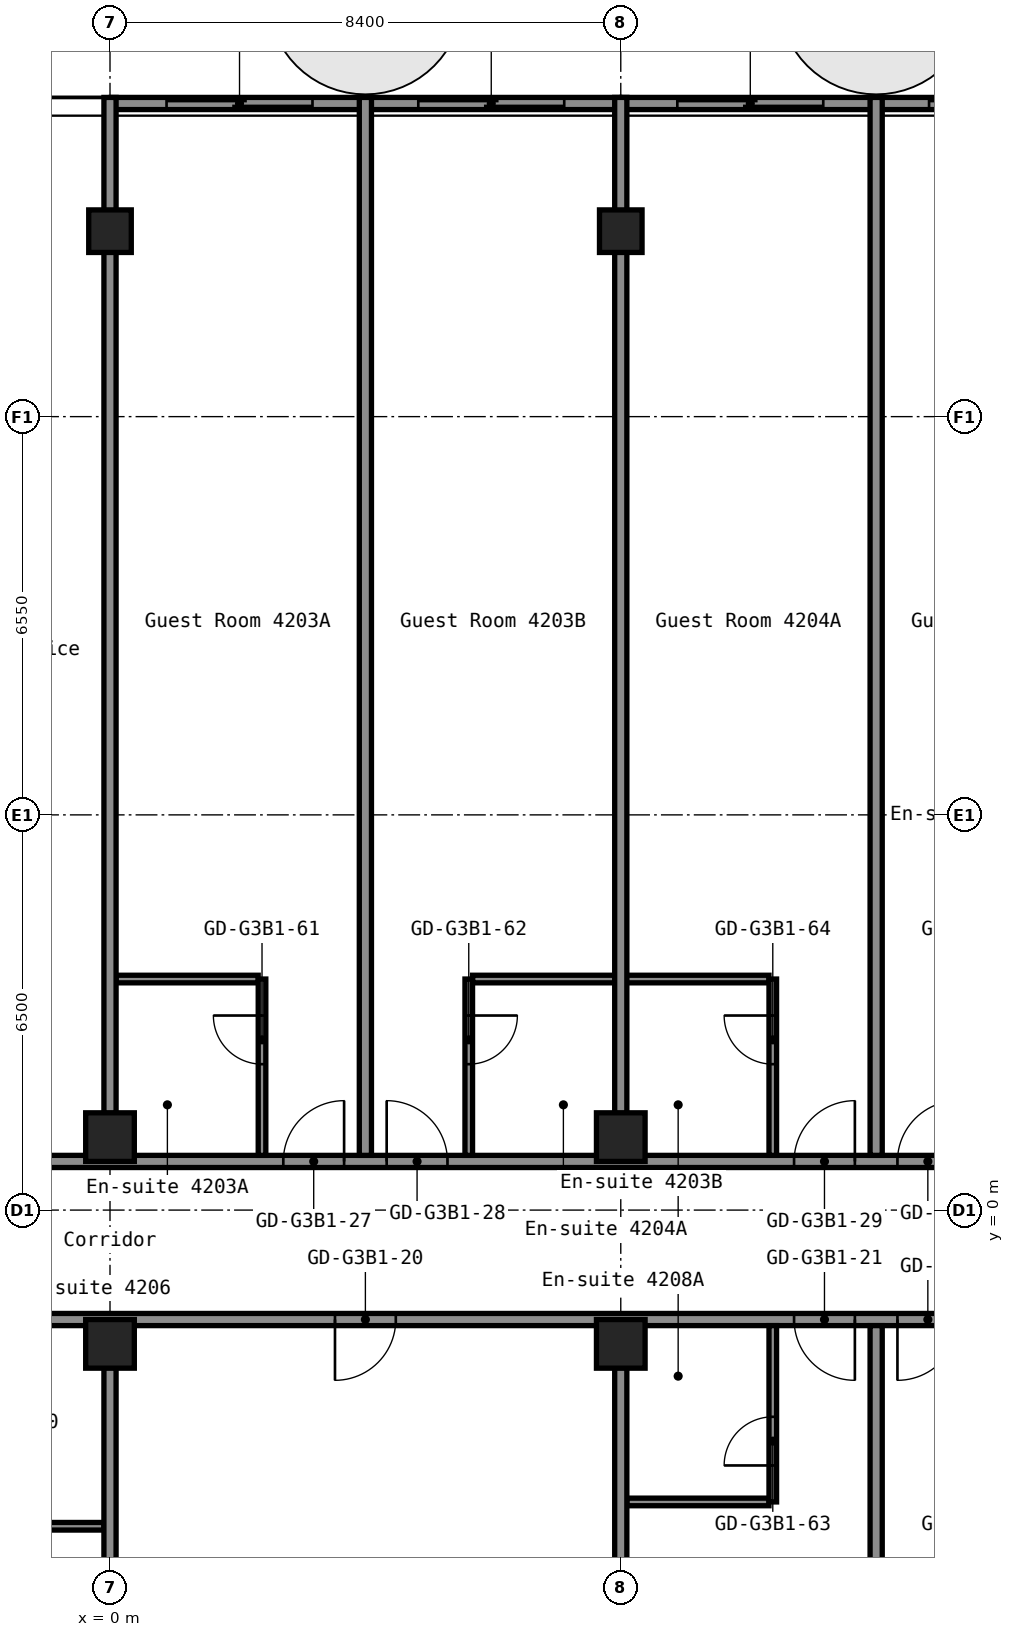
"""IFC4 building model, lengths in metres.
Left out: names, types, materials, properties, quantities, classifications, styles, units other than length and angle.
Written with IfcOpenShell. Run it as: python <this file> out.ifc"""

import sys

from ifc_helpers import new_model, si_unit, direction, frame, frame_2d, origin, origin_2d, place, context, subcontext, project, spatial, rectangle, hollow_rectangle, extrude, element, fill, save


model = new_model("IFC4")
c1 = context("Model", 3, precision=1e-05, world=origin(), true_north=direction((0.0, 1.0)))
c2 = subcontext(c1, "Body", "Model", "MODEL_VIEW")
j1 = project(units=[si_unit("LENGTHUNIT", "METRE"), si_unit("PLANEANGLEUNIT", "RADIAN")], contexts=[c1])
p1 = place(None, origin())
s1 = spatial("IfcSite", under=j1, at=p1, CompositionType="ELEMENT")
p2 = place(p1, origin())
s2 = spatial("IfcBuilding", under=s1, at=p2, CompositionType="ELEMENT")
p3 = place(p2, frame((0.0, 0.0, 150.2)))
s3 = spatial("IfcBuildingStorey", under=s2, at=p3, CompositionType="ELEMENT", Elevation=150.2)
for number, where, z_axis, x_axis in (
    (1, (0.0, -2.2, 0.0), (0.0, 0.0, 1.0), (1.0, 0.0, 0.0)),
    (2, (0.0, 1.2, 0.0), (0.0, 0.0, 1.0), (1.0, 0.0, 0.0)),
):
    element("IfcColumn", number, at=place(p3, frame(where, z_axis=z_axis, x_axis=x_axis)), inside=s3, PredefinedType="COLUMN", context=c2, shape_type="SweptSolid", body=[
        extrude(hollow_rectangle(XDim=0.8, YDim=0.8, WallThickness=0.032, at=origin_2d()), origin(), (0.0, 0.0, 1.0), 2.75),
    ])
p4 = place(p3, frame((0.0, 16.1, 0.0), z_axis=(0.0, 0.0, 1.0), x_axis=(1.0, 0.0, 0.0)))
e3 = element("IfcColumn", 3, at=p4, inside=s3, PredefinedType="COLUMN", context=c2, shape_type="SweptSolid", body=[
    extrude(hollow_rectangle(XDim=0.7, YDim=0.7, WallThickness=0.028, at=origin_2d()), origin(), (0.0, 0.0, 1.0), 2.75),
])
for number, where, z_axis, x_axis in (
    (4, (8.4, -2.2, 0.0), (0.0, 0.0, 1.0), (1.0, 0.0, 0.0)),
    (5, (8.4, 1.2, 0.0), (0.0, 0.0, 1.0), (1.0, 0.0, 0.0)),
):
    element("IfcColumn", number, at=place(p3, frame(where, z_axis=z_axis, x_axis=x_axis)), inside=s3, PredefinedType="COLUMN", context=c2, shape_type="SweptSolid", body=[
        extrude(hollow_rectangle(XDim=0.8, YDim=0.8, WallThickness=0.032, at=origin_2d()), origin(), (0.0, 0.0, 1.0), 2.75),
    ])
p5 = place(p3, frame((8.4, 16.1, 0.0), z_axis=(0.0, 0.0, 1.0), x_axis=(1.0, 0.0, 0.0)))
e6 = element("IfcColumn", 6, at=p5, inside=s3, PredefinedType="COLUMN", context=c2, shape_type="SweptSolid", body=[
    extrude(hollow_rectangle(XDim=0.7, YDim=0.7, WallThickness=0.028, at=origin_2d()), origin(), (0.0, 0.0, 1.0), 2.75),
])
p6 = place(p3, frame((-3.538, -5.2, 0.0), z_axis=(0.0, 0.0, 1.0), x_axis=(1.0, 0.0, 0.0)))
e7 = element("IfcWall", 7, at=p6, inside=s3, PredefinedType="PARTITIONING", context=c2, shape_type="SweptSolid", body=[
    extrude(rectangle(XDim=3.438, YDim=0.125, at=frame_2d((1.719, 0.0))), origin(), (0.0, 0.0, 1.0), 2.75),
])
p7 = place(p3, frame((8.5, -4.8, 0.0), z_axis=(0.0, 0.0, 1.0), x_axis=(1.0, 0.0, 0.0)))
e8 = element("IfcWall", 8, at=p7, inside=s3, PredefinedType="PARTITIONING", context=c2, shape_type="SweptSolid", body=[
    extrude(rectangle(XDim=2.337, YDim=0.125, at=frame_2d((1.169, 0.0))), origin(), (0.0, 0.0, 1.0), 2.75),
])
p8 = place(p3, frame((-16.8, -1.8, 0.0), z_axis=(0.0, 0.0, 1.0), x_axis=(1.0, 0.0, 0.0)))
e9 = element("IfcWall", 9, at=p8, inside=s3, PredefinedType="PARTITIONING", context=c2, shape_type="SweptSolid", body=[
    extrude(rectangle(XDim=33.6, YDim=0.2, at=frame_2d((16.8, 0.0))), origin(), (0.0, 0.0, 1.0), 2.75),
])
p9 = place(p8, frame((2.85, 0.0, 0.0)))
e10 = element("IfcOpeningElement", 10, at=p9, cuts=e9, PredefinedType="OPENING", context=c2, shape_type="SweptSolid", body=[
    extrude(rectangle(XDim=1.0, YDim=2.1, at=frame_2d((0.5, 1.05))), frame((0.0, 0.11, 0.0), z_axis=(0.0, -1.0, 0.0), x_axis=(1.0, 0.0, 0.0)), (0.0, 0.0, 1.0), 0.22),
])
p10 = place(p8, frame((4.55, 0.0, 0.0)))
e11 = element("IfcOpeningElement", 11, at=p10, cuts=e9, PredefinedType="OPENING", context=c2, shape_type="SweptSolid", body=[
    extrude(rectangle(XDim=1.0, YDim=2.1, at=frame_2d((0.5, 1.05))), frame((0.0, 0.11, 0.0), z_axis=(0.0, -1.0, 0.0), x_axis=(1.0, 0.0, 0.0)), (0.0, 0.0, 1.0), 0.22),
])
p11 = place(p8, frame((10.3, 0.0, 0.0)))
e12 = element("IfcOpeningElement", 12, at=p11, cuts=e9, PredefinedType="OPENING", context=c2, shape_type="SweptSolid", body=[
    extrude(rectangle(XDim=1.0, YDim=2.1, at=frame_2d((0.5, 1.05))), frame((0.0, 0.11, 0.0), z_axis=(0.0, -1.0, 0.0), x_axis=(1.0, 0.0, 0.0)), (0.0, 0.0, 1.0), 0.22),
])
p12 = place(p8, frame((20.5, 0.0, 0.0)))
e13 = element("IfcOpeningElement", 13, at=p12, cuts=e9, PredefinedType="OPENING", context=c2, shape_type="SweptSolid", body=[
    extrude(rectangle(XDim=1.0, YDim=2.1, at=frame_2d((0.5, 1.05))), frame((0.0, 0.11, 0.0), z_axis=(0.0, -1.0, 0.0), x_axis=(1.0, 0.0, 0.0)), (0.0, 0.0, 1.0), 0.22),
])
p13 = place(p8, frame((28.05, 0.0, 0.0)))
e14 = element("IfcOpeningElement", 14, at=p13, cuts=e9, PredefinedType="OPENING", context=c2, shape_type="SweptSolid", body=[
    extrude(rectangle(XDim=1.0, YDim=2.1, at=frame_2d((0.5, 1.05))), frame((0.0, 0.11, 0.0), z_axis=(0.0, -1.0, 0.0), x_axis=(1.0, 0.0, 0.0)), (0.0, 0.0, 1.0), 0.22),
])
p14 = place(p8, frame((29.75, 0.0, 0.0)))
e15 = element("IfcOpeningElement", 15, at=p14, cuts=e9, PredefinedType="OPENING", context=c2, shape_type="SweptSolid", body=[
    extrude(rectangle(XDim=1.0, YDim=2.1, at=frame_2d((0.5, 1.05))), frame((0.0, 0.11, 0.0), z_axis=(0.0, -1.0, 0.0), x_axis=(1.0, 0.0, 0.0)), (0.0, 0.0, 1.0), 0.22),
])
p15 = place(p3, frame((-16.8, 0.8, 0.0), z_axis=(0.0, 0.0, 1.0), x_axis=(1.0, 0.0, 0.0)))
e16 = element("IfcWall", 16, at=p15, inside=s3, PredefinedType="PARTITIONING", context=c2, shape_type="SweptSolid", body=[
    extrude(rectangle(XDim=33.6, YDim=0.2, at=frame_2d((16.8, 0.0))), origin(), (0.0, 0.0, 1.0), 2.75),
])
p16 = place(p15, frame((2.85, 0.0, 0.0)))
e17 = element("IfcOpeningElement", 17, at=p16, cuts=e16, PredefinedType="OPENING", context=c2, shape_type="SweptSolid", body=[
    extrude(rectangle(XDim=1.0, YDim=2.1, at=frame_2d((0.5, 1.05))), frame((0.0, 0.11, 0.0), z_axis=(0.0, -1.0, 0.0), x_axis=(1.0, 0.0, 0.0)), (0.0, 0.0, 1.0), 0.22),
])
p17 = place(p15, frame((4.55, 0.0, 0.0)))
e18 = element("IfcOpeningElement", 18, at=p17, cuts=e16, PredefinedType="OPENING", context=c2, shape_type="SweptSolid", body=[
    extrude(rectangle(XDim=1.0, YDim=2.1, at=frame_2d((0.5, 1.05))), frame((0.0, 0.11, 0.0), z_axis=(0.0, -1.0, 0.0), x_axis=(1.0, 0.0, 0.0)), (0.0, 0.0, 1.0), 0.22),
])
p18 = place(p15, frame((10.22, 0.0, 0.0)))
e19 = element("IfcOpeningElement", 19, at=p18, cuts=e16, PredefinedType="OPENING", context=c2, shape_type="SweptSolid", body=[
    extrude(rectangle(XDim=0.9, YDim=2.1, at=frame_2d((0.45, 1.05))), frame((0.0, 0.11, 0.0), z_axis=(0.0, -1.0, 0.0), x_axis=(1.0, 0.0, 0.0)), (0.0, 0.0, 1.0), 0.22),
])
p19 = place(p15, frame((14.42, 0.0, 0.0)))
e20 = element("IfcOpeningElement", 20, at=p19, cuts=e16, PredefinedType="OPENING", context=c2, shape_type="SweptSolid", body=[
    extrude(rectangle(XDim=0.9, YDim=2.1, at=frame_2d((0.45, 1.05))), frame((0.0, 0.11, 0.0), z_axis=(0.0, -1.0, 0.0), x_axis=(1.0, 0.0, 0.0)), (0.0, 0.0, 1.0), 0.22),
])
p20 = place(p15, frame((19.65, 0.0, 0.0)))
e21 = element("IfcOpeningElement", 21, at=p20, cuts=e16, PredefinedType="OPENING", context=c2, shape_type="SweptSolid", body=[
    extrude(rectangle(XDim=1.0, YDim=2.1, at=frame_2d((0.5, 1.05))), frame((0.0, 0.11, 0.0), z_axis=(0.0, -1.0, 0.0), x_axis=(1.0, 0.0, 0.0)), (0.0, 0.0, 1.0), 0.22),
])
p21 = place(p15, frame((21.35, 0.0, 0.0)))
e22 = element("IfcOpeningElement", 22, at=p21, cuts=e16, PredefinedType="OPENING", context=c2, shape_type="SweptSolid", body=[
    extrude(rectangle(XDim=1.0, YDim=2.1, at=frame_2d((0.5, 1.05))), frame((0.0, 0.11, 0.0), z_axis=(0.0, -1.0, 0.0), x_axis=(1.0, 0.0, 0.0)), (0.0, 0.0, 1.0), 0.22),
])
p22 = place(p15, frame((28.05, 0.0, 0.0)))
e23 = element("IfcOpeningElement", 23, at=p22, cuts=e16, PredefinedType="OPENING", context=c2, shape_type="SweptSolid", body=[
    extrude(rectangle(XDim=1.0, YDim=2.1, at=frame_2d((0.5, 1.05))), frame((0.0, 0.11, 0.0), z_axis=(0.0, -1.0, 0.0), x_axis=(1.0, 0.0, 0.0)), (0.0, 0.0, 1.0), 0.22),
])
p23 = place(p15, frame((29.75, 0.0, 0.0)))
e24 = element("IfcOpeningElement", 24, at=p23, cuts=e16, PredefinedType="OPENING", context=c2, shape_type="SweptSolid", body=[
    extrude(rectangle(XDim=1.0, YDim=2.1, at=frame_2d((0.5, 1.05))), frame((0.0, 0.11, 0.0), z_axis=(0.0, -1.0, 0.0), x_axis=(1.0, 0.0, 0.0)), (0.0, 0.0, 1.0), 0.22),
])
p24 = place(p3, frame((0.1, 3.8, 0.0), z_axis=(0.0, 0.0, 1.0), x_axis=(1.0, 0.0, 0.0)))
e25 = element("IfcWall", 25, at=p24, inside=s3, PredefinedType="PARTITIONING", context=c2, shape_type="SweptSolid", body=[
    extrude(rectangle(XDim=2.337, YDim=0.125, at=frame_2d((1.169, 0.0))), origin(), (0.0, 0.0, 1.0), 2.75),
])
p25 = place(p3, frame((5.962, 3.8, 0.0), z_axis=(0.0, 0.0, 1.0), x_axis=(1.0, 0.0, 0.0)))
e26 = element("IfcWall", 26, at=p25, inside=s3, PredefinedType="PARTITIONING", context=c2, shape_type="SweptSolid", body=[
    extrude(rectangle(XDim=4.875, YDim=0.125, at=frame_2d((2.438, 0.0))), origin(), (0.0, 0.0, 1.0), 2.75),
])
for number, where, z_axis, x_axis in (
    (27, (0.0, -19.3, 0.0), (0.0, 0.0, 1.0), (0.0, 1.0, 0.0)),
    (28, (0.0, 1.59, 0.0), (0.0, 0.0, 1.0), (0.0, 1.0, 0.0)),
):
    element("IfcWall", number, at=place(p3, frame(where, z_axis=z_axis, x_axis=x_axis)), inside=s3, PredefinedType="PARTITIONING", context=c2, shape_type="SweptSolid", body=[
        extrude(rectangle(XDim=16.71, YDim=0.2, at=frame_2d((8.355, 0.0))), origin(), (0.0, 0.0, 1.0), 2.75),
    ])
p26 = place(p3, frame((2.5, 0.9, 0.0), z_axis=(0.0, 0.0, 1.0), x_axis=(0.0, 1.0, 0.0)))
e29 = element("IfcWall", 29, at=p26, inside=s3, PredefinedType="PARTITIONING", context=c2, shape_type="SweptSolid", body=[
    extrude(rectangle(XDim=2.9, YDim=0.125, at=frame_2d((1.45, 0.0))), origin(), (0.0, 0.0, 1.0), 2.75),
])
p27 = place(p26, frame((1.5, 0.0, 0.0)))
e30 = element("IfcOpeningElement", 30, at=p27, cuts=e29, PredefinedType="OPENING", context=c2, shape_type="SweptSolid", body=[
    extrude(rectangle(XDim=0.8, YDim=2.1, at=frame_2d((0.4, 1.05))), frame((0.0, 0.073, 0.0), z_axis=(0.0, -1.0, 0.0), x_axis=(1.0, 0.0, 0.0)), (0.0, 0.0, 1.0), 0.145),
])
p28 = place(p3, frame((4.2, 0.9, 0.0), z_axis=(0.0, 0.0, 1.0), x_axis=(0.0, 1.0, 0.0)))
e31 = element("IfcWall", 31, at=p28, inside=s3, PredefinedType="PARTITIONING", context=c2, shape_type="SweptSolid", body=[
    extrude(rectangle(XDim=17.4, YDim=0.2, at=frame_2d((8.7, 0.0))), origin(), (0.0, 0.0, 1.0), 2.75),
])
p29 = place(p3, frame((5.9, 0.9, 0.0), z_axis=(0.0, 0.0, 1.0), x_axis=(0.0, 1.0, 0.0)))
e32 = element("IfcWall", 32, at=p29, inside=s3, PredefinedType="PARTITIONING", context=c2, shape_type="SweptSolid", body=[
    extrude(rectangle(XDim=2.9, YDim=0.125, at=frame_2d((1.45, 0.0))), origin(), (0.0, 0.0, 1.0), 2.75),
])
p30 = place(p29, frame((1.5, 0.0, 0.0)))
e33 = element("IfcOpeningElement", 33, at=p30, cuts=e32, PredefinedType="OPENING", context=c2, shape_type="SweptSolid", body=[
    extrude(rectangle(XDim=0.8, YDim=2.1, at=frame_2d((0.4, 1.05))), frame((0.0, 0.073, 0.0), z_axis=(0.0, -1.0, 0.0), x_axis=(1.0, 0.0, 0.0)), (0.0, 0.0, 1.0), 0.145),
])
for number, where, z_axis, x_axis in (
    (34, (8.4, -19.3, 0.0), (0.0, 0.0, 1.0), (0.0, 1.0, 0.0)),
    (35, (8.4, 1.59, 0.0), (0.0, 0.0, 1.0), (0.0, 1.0, 0.0)),
):
    element("IfcWall", number, at=place(p3, frame(where, z_axis=z_axis, x_axis=x_axis)), inside=s3, PredefinedType="PARTITIONING", context=c2, shape_type="SweptSolid", body=[
        extrude(rectangle(XDim=16.71, YDim=0.2, at=frame_2d((8.355, 0.0))), origin(), (0.0, 0.0, 1.0), 2.75),
    ])
p31 = place(p3, frame((10.9, -4.8, 0.0), z_axis=(0.0, 0.0, 1.0), x_axis=(0.0, 1.0, 0.0)))
e36 = element("IfcWall", 36, at=p31, inside=s3, PredefinedType="PARTITIONING", context=c2, shape_type="SweptSolid", body=[
    extrude(rectangle(XDim=2.9, YDim=0.125, at=frame_2d((1.45, 0.0))), origin(), (0.0, 0.0, 1.0), 2.75),
])
p32 = place(p31, frame((0.6, 0.0, 0.0)))
e37 = element("IfcOpeningElement", 37, at=p32, cuts=e36, PredefinedType="OPENING", context=c2, shape_type="SweptSolid", body=[
    extrude(rectangle(XDim=0.8, YDim=2.1, at=frame_2d((0.4, 1.05))), frame((0.0, 0.073, 0.0), z_axis=(0.0, -1.0, 0.0), x_axis=(1.0, 0.0, 0.0)), (0.0, 0.0, 1.0), 0.145),
])
p33 = place(p3, frame((10.9, 0.9, 0.0), z_axis=(0.0, 0.0, 1.0), x_axis=(0.0, 1.0, 0.0)))
e38 = element("IfcWall", 38, at=p33, inside=s3, PredefinedType="PARTITIONING", context=c2, shape_type="SweptSolid", body=[
    extrude(rectangle(XDim=2.9, YDim=0.125, at=frame_2d((1.45, 0.0))), origin(), (0.0, 0.0, 1.0), 2.75),
])
p34 = place(p33, frame((1.5, 0.0, 0.0)))
e39 = element("IfcOpeningElement", 39, at=p34, cuts=e38, PredefinedType="OPENING", context=c2, shape_type="SweptSolid", body=[
    extrude(rectangle(XDim=0.8, YDim=2.1, at=frame_2d((0.4, 1.05))), frame((0.0, 0.073, 0.0), z_axis=(0.0, -1.0, 0.0), x_axis=(1.0, 0.0, 0.0)), (0.0, 0.0, 1.0), 0.145),
])
for number, where, z_axis, x_axis in (
    (40, (12.6, -19.3, 0.0), (0.0, 0.0, 1.0), (0.0, 1.0, 0.0)),
    (41, (12.6, 0.9, 0.0), (0.0, 0.0, 1.0), (0.0, 1.0, 0.0)),
):
    element("IfcWall", number, at=place(p3, frame(where, z_axis=z_axis, x_axis=x_axis)), inside=s3, PredefinedType="PARTITIONING", context=c2, shape_type="SweptSolid", body=[
        extrude(rectangle(XDim=17.4, YDim=0.2, at=frame_2d((8.7, 0.0))), origin(), (0.0, 0.0, 1.0), 2.75),
    ])
p35 = place(p3, frame((16.78, 18.2, 0.0), z_axis=(0.0, 0.0, 1.0), x_axis=(-1.0, 0.0, 0.0)))
p36 = place(p35, frame((0.91, 0.0, 0.0)))
p37 = place(p36, frame((2.4, 0.0, 0.0), z_axis=(0.0, 0.0, 1.0), x_axis=(-1.0, 0.0, 0.0)))
e42 = element("IfcDoor", 42, at=p37, inside=s3, OperationType="SLIDING_TO_LEFT", PredefinedType="DOOR", context=c2, shape_type="SweptSolid", body=[
    extrude(rectangle(XDim=2.4, YDim=2.2, at=frame_2d((1.2, 1.1))), frame((0.0, 0.025, 0.0), z_axis=(0.0, -1.0, 0.0), x_axis=(1.0, 0.0, 0.0)), (0.0, 0.0, 1.0), 0.05),
])
p38 = place(p3, frame((12.64, 18.2, 0.0), z_axis=(0.0, 0.0, 1.0), x_axis=(-1.0, 0.0, 0.0)))
p39 = place(p38, frame((0.91, 0.0, 0.0)))
p40 = place(p39, frame((2.4, 0.0, 0.0), z_axis=(0.0, 0.0, 1.0), x_axis=(-1.0, 0.0, 0.0)))
e43 = element("IfcDoor", 43, at=p40, inside=s3, OperationType="SLIDING_TO_LEFT", PredefinedType="DOOR", context=c2, shape_type="SweptSolid", body=[
    extrude(rectangle(XDim=2.4, YDim=2.2, at=frame_2d((1.2, 1.1))), frame((0.0, 0.025, 0.0), z_axis=(0.0, -1.0, 0.0), x_axis=(1.0, 0.0, 0.0)), (0.0, 0.0, 1.0), 0.05),
])
p41 = place(p3, frame((8.38, 18.2, 0.0), z_axis=(0.0, 0.0, 1.0), x_axis=(-1.0, 0.0, 0.0)))
p42 = place(p41, frame((0.91, 0.0, 0.0)))
p43 = place(p42, frame((2.4, 0.0, 0.0), z_axis=(0.0, 0.0, 1.0), x_axis=(-1.0, 0.0, 0.0)))
e44 = element("IfcDoor", 44, at=p43, inside=s3, OperationType="SLIDING_TO_LEFT", PredefinedType="DOOR", context=c2, shape_type="SweptSolid", body=[
    extrude(rectangle(XDim=2.4, YDim=2.2, at=frame_2d((1.2, 1.1))), frame((0.0, 0.025, 0.0), z_axis=(0.0, -1.0, 0.0), x_axis=(1.0, 0.0, 0.0)), (0.0, 0.0, 1.0), 0.05),
])
p44 = place(p3, frame((4.24, 18.2, 0.0), z_axis=(0.0, 0.0, 1.0), x_axis=(-1.0, 0.0, 0.0)))
p45 = place(p44, frame((0.91, 0.0, 0.0)))
p46 = place(p45, frame((2.4, 0.0, 0.0), z_axis=(0.0, 0.0, 1.0), x_axis=(-1.0, 0.0, 0.0)))
e45 = element("IfcDoor", 45, at=p46, inside=s3, OperationType="SLIDING_TO_LEFT", PredefinedType="DOOR", context=c2, shape_type="SweptSolid", body=[
    extrude(rectangle(XDim=2.4, YDim=2.2, at=frame_2d((1.2, 1.1))), frame((0.0, 0.025, 0.0), z_axis=(0.0, -1.0, 0.0), x_axis=(1.0, 0.0, 0.0)), (0.0, 0.0, 1.0), 0.05),
])
p47 = place(p12, origin())
e46 = element("IfcDoor", 46, at=p47, inside=s3, OperationType="SINGLE_SWING_LEFT", PredefinedType="DOOR", context=c2, shape_type="SweptSolid", body=[
    extrude(rectangle(XDim=1.0, YDim=2.1, at=frame_2d((0.5, 1.05))), frame((0.0, 0.025, 0.0), z_axis=(0.0, -1.0, 0.0), x_axis=(1.0, 0.0, 0.0)), (0.0, 0.0, 1.0), 0.05),
])
fill(e13, e46)
p48 = place(p13, origin())
e47 = element("IfcDoor", 47, at=p48, inside=s3, OperationType="SINGLE_SWING_RIGHT", PredefinedType="DOOR", context=c2, shape_type="SweptSolid", body=[
    extrude(rectangle(XDim=1.0, YDim=2.1, at=frame_2d((0.5, 1.05))), frame((0.0, 0.025, 0.0), z_axis=(0.0, -1.0, 0.0), x_axis=(1.0, 0.0, 0.0)), (0.0, 0.0, 1.0), 0.05),
])
fill(e14, e47)
p49 = place(p14, origin())
e48 = element("IfcDoor", 48, at=p49, inside=s3, OperationType="SINGLE_SWING_LEFT", PredefinedType="DOOR", context=c2, shape_type="SweptSolid", body=[
    extrude(rectangle(XDim=1.0, YDim=2.1, at=frame_2d((0.5, 1.05))), frame((0.0, 0.025, 0.0), z_axis=(0.0, -1.0, 0.0), x_axis=(1.0, 0.0, 0.0)), (0.0, 0.0, 1.0), 0.05),
])
fill(e15, e48)
p50 = place(p20, origin())
e49 = element("IfcDoor", 49, at=p50, inside=s3, OperationType="SINGLE_SWING_LEFT", PredefinedType="DOOR", context=c2, shape_type="SweptSolid", body=[
    extrude(rectangle(XDim=1.0, YDim=2.1, at=frame_2d((0.5, 1.05))), frame((0.0, 0.025, 0.0), z_axis=(0.0, -1.0, 0.0), x_axis=(1.0, 0.0, 0.0)), (0.0, 0.0, 1.0), 0.05),
])
fill(e21, e49)
p51 = place(p21, origin())
e50 = element("IfcDoor", 50, at=p51, inside=s3, OperationType="SINGLE_SWING_RIGHT", PredefinedType="DOOR", context=c2, shape_type="SweptSolid", body=[
    extrude(rectangle(XDim=1.0, YDim=2.1, at=frame_2d((0.5, 1.05))), frame((0.0, 0.025, 0.0), z_axis=(0.0, -1.0, 0.0), x_axis=(1.0, 0.0, 0.0)), (0.0, 0.0, 1.0), 0.05),
])
fill(e22, e50)
p52 = place(p22, origin())
e51 = element("IfcDoor", 51, at=p52, inside=s3, OperationType="SINGLE_SWING_LEFT", PredefinedType="DOOR", context=c2, shape_type="SweptSolid", body=[
    extrude(rectangle(XDim=1.0, YDim=2.1, at=frame_2d((0.5, 1.05))), frame((0.0, 0.025, 0.0), z_axis=(0.0, -1.0, 0.0), x_axis=(1.0, 0.0, 0.0)), (0.0, 0.0, 1.0), 0.05),
])
fill(e23, e51)
p53 = place(p23, origin())
e52 = element("IfcDoor", 52, at=p53, inside=s3, OperationType="SINGLE_SWING_LEFT", PredefinedType="DOOR", context=c2, shape_type="SweptSolid", body=[
    extrude(rectangle(XDim=1.0, YDim=2.1, at=frame_2d((0.5, 1.05))), frame((0.0, 0.025, 0.0), z_axis=(0.0, -1.0, 0.0), x_axis=(1.0, 0.0, 0.0)), (0.0, 0.0, 1.0), 0.05),
])
fill(e24, e52)
p54 = place(p27, origin())
e53 = element("IfcDoor", 53, at=p54, inside=s3, OperationType="SINGLE_SWING_LEFT", PredefinedType="DOOR", context=c2, shape_type="SweptSolid", body=[
    extrude(rectangle(XDim=0.8, YDim=2.1, at=frame_2d((0.4, 1.05))), frame((0.0, 0.025, 0.0), z_axis=(0.0, -1.0, 0.0), x_axis=(1.0, 0.0, 0.0)), (0.0, 0.0, 1.0), 0.05),
])
fill(e30, e53)
p55 = place(p30, origin())
e54 = element("IfcDoor", 54, at=p55, inside=s3, OperationType="SINGLE_SWING_RIGHT", PredefinedType="DOOR", context=c2, shape_type="SweptSolid", body=[
    extrude(rectangle(XDim=0.8, YDim=2.1, at=frame_2d((0.4, 1.05))), frame((0.0, 0.025, 0.0), z_axis=(0.0, -1.0, 0.0), x_axis=(1.0, 0.0, 0.0)), (0.0, 0.0, 1.0), 0.05),
])
fill(e33, e54)
p56 = place(p32, origin())
e55 = element("IfcDoor", 55, at=p56, inside=s3, OperationType="SINGLE_SWING_RIGHT", PredefinedType="DOOR", context=c2, shape_type="SweptSolid", body=[
    extrude(rectangle(XDim=0.8, YDim=2.1, at=frame_2d((0.4, 1.05))), frame((0.0, 0.025, 0.0), z_axis=(0.0, -1.0, 0.0), x_axis=(1.0, 0.0, 0.0)), (0.0, 0.0, 1.0), 0.05),
])
fill(e37, e55)
p57 = place(p34, origin())
e56 = element("IfcDoor", 56, at=p57, inside=s3, OperationType="SINGLE_SWING_LEFT", PredefinedType="DOOR", context=c2, shape_type="SweptSolid", body=[
    extrude(rectangle(XDim=0.8, YDim=2.1, at=frame_2d((0.4, 1.05))), frame((0.0, 0.025, 0.0), z_axis=(0.0, -1.0, 0.0), x_axis=(1.0, 0.0, 0.0)), (0.0, 0.0, 1.0), 0.05),
])
fill(e39, e56)
save(model, sys.argv[1])
